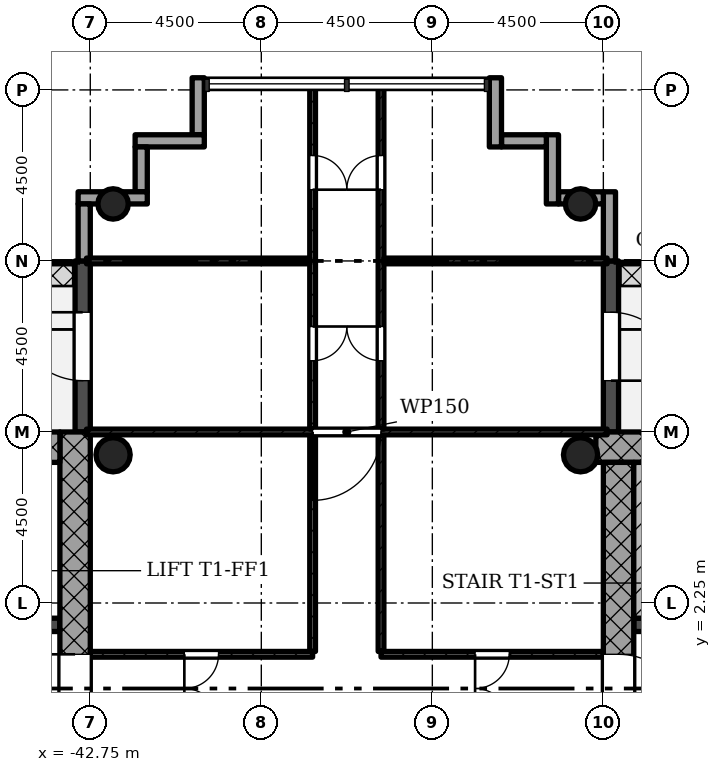
"""IFC4 building model, lengths in metres.
Left out: names, types, materials, properties, quantities, classifications, styles, units other than length and angle.
Written with IfcOpenShell. Run it as: python <this file> out.ifc"""

import sys

from ifc_helpers import new_model, si_unit, direction, frame, frame_2d, origin, origin_2d, place, context, subcontext, project, spatial, rectangle, hollow_circle, extrude, element, fill, save


model = new_model("IFC4")
c1 = context("Model", 3, precision=1e-05, world=origin(), true_north=direction((0.0, 1.0)))
c2 = subcontext(c1, "Body", "Model", "MODEL_VIEW")
j1 = project(units=[si_unit("LENGTHUNIT", "METRE"), si_unit("PLANEANGLEUNIT", "RADIAN")], contexts=[c1])
p1 = place(None, origin())
s1 = spatial("IfcSite", under=j1, at=p1, CompositionType="ELEMENT")
p2 = place(p1, origin())
s2 = spatial("IfcBuilding", under=s1, at=p2, CompositionType="ELEMENT")
p3 = place(p2, frame((0.0, 0.0, 128.7)))
s3 = spatial("IfcBuildingStorey", under=s2, at=p3, CompositionType="ELEMENT", Elevation=128.7)
p4 = place(p3, frame((-20.652, 6.35, 0.0), z_axis=(0.0, 0.0, 1.0), x_axis=(-1.0, 0.0, 0.0)))
e1 = element("IfcWall", 1, at=p4, inside=s3, PredefinedType="SHEAR", context=c2, shape_type="SweptSolid", body=[
    extrude(rectangle(XDim=8.796, YDim=0.8, at=frame_2d((4.398, 0.0))), origin(), (0.0, 0.0, 1.0), 5.0),
])
p5 = place(p3, frame((-28.85, 5.95, 0.0), z_axis=(0.0, 0.0, 1.0), x_axis=(0.0, -1.0, 0.0)))
e2 = element("IfcWall", 2, at=p5, inside=s3, PredefinedType="SHEAR", context=c2, shape_type="SweptSolid", body=[
    extrude(rectangle(XDim=12.7, YDim=0.8, at=frame_2d((6.35, 0.0))), origin(), (0.0, 0.0, 1.0), 5.0),
])
p6 = place(p5, frame((5.05, 0.0, 0.0)))
e3 = element("IfcOpeningElement", 3, at=p6, cuts=e2, PredefinedType="OPENING", context=c2, shape_type="SweptSolid", body=[
    extrude(rectangle(XDim=1.8, YDim=2.1, at=frame_2d((0.9, 1.05))), frame((0.0, 0.41, 0.0), z_axis=(0.0, -1.0, 0.0), x_axis=(1.0, 0.0, 0.0)), (0.0, 0.0, 1.0), 0.82),
])
p7 = place(p3, frame((-28.45, 1.675, 0.0), z_axis=(0.0, 0.0, 1.0), x_axis=(1.0, 0.0, 0.0)))
e4 = element("IfcWall", 4, at=p7, inside=s3, PredefinedType="SHEAR", context=c2, shape_type="SweptSolid", body=[
    extrude(rectangle(XDim=7.4, YDim=0.35, at=frame_2d((3.7, 0.0))), origin(), (0.0, 0.0, 1.0), 5.0),
])
p8 = place(p7, frame((0.85, 0.0, 0.0)))
e5 = element("IfcOpeningElement", 5, at=p8, cuts=e4, PredefinedType="OPENING", context=c2, shape_type="SweptSolid", body=[
    extrude(rectangle(XDim=0.9, YDim=2.1, at=frame_2d((0.45, 1.05))), frame((0.0, 0.185, 0.0), z_axis=(0.0, -1.0, 0.0), x_axis=(1.0, 0.0, 0.0)), (0.0, 0.0, 1.0), 0.37),
])
p9 = place(p3, frame((-43.15, -5.95, 0.0), z_axis=(0.0, 0.0, 1.0), x_axis=(0.0, 1.0, 0.0)))
e6 = element("IfcWall", 6, at=p9, inside=s3, PredefinedType="SHEAR", context=c2, shape_type="SweptSolid", body=[
    extrude(rectangle(XDim=12.7, YDim=0.8, at=frame_2d((6.35, 0.0))), origin(), (0.0, 0.0, 1.0), 5.0),
])
p10 = place(p9, frame((5.05, 0.0, 0.0)))
e7 = element("IfcOpeningElement", 7, at=p10, cuts=e6, PredefinedType="OPENING", context=c2, shape_type="SweptSolid", body=[
    extrude(rectangle(XDim=1.8, YDim=2.1, at=frame_2d((0.9, 1.05))), frame((0.0, 0.41, 0.0), z_axis=(0.0, -1.0, 0.0), x_axis=(1.0, 0.0, 0.0)), (0.0, 0.0, 1.0), 0.82),
])
p11 = place(p3, frame((-43.55, 6.35, 0.0), z_axis=(0.0, 0.0, 1.0), x_axis=(-1.0, 0.0, 0.0)))
e8 = element("IfcWall", 8, at=p11, inside=s3, PredefinedType="SHEAR", context=c2, shape_type="SweptSolid", body=[
    extrude(rectangle(XDim=8.2, YDim=0.8, at=frame_2d((4.1, 0.0))), origin(), (0.0, 0.0, 1.0), 5.0),
])
p12 = place(p3, frame((-50.95, 1.675, 0.0), z_axis=(0.0, 0.0, 1.0), x_axis=(1.0, 0.0, 0.0)))
e9 = element("IfcWall", 9, at=p12, inside=s3, PredefinedType="SHEAR", context=c2, shape_type="SweptSolid", body=[
    extrude(rectangle(XDim=7.4, YDim=0.35, at=frame_2d((3.7, 0.0))), origin(), (0.0, 0.0, 1.0), 5.0),
])
p13 = place(p12, frame((5.35, 0.0, 0.0)))
e10 = element("IfcOpeningElement", 10, at=p13, cuts=e9, PredefinedType="OPENING", context=c2, shape_type="SweptSolid", body=[
    extrude(rectangle(XDim=1.1, YDim=2.1, at=frame_2d((0.55, 1.05))), frame((0.0, 0.185, 0.0), z_axis=(0.0, -1.0, 0.0), x_axis=(1.0, 0.0, 0.0)), (0.0, 0.0, 1.0), 0.37),
])
p14 = place(p12, frame((3.2, 0.0, 0.0)))
e11 = element("IfcOpeningElement", 11, at=p14, cuts=e9, PredefinedType="OPENING", context=c2, shape_type="SweptSolid", body=[
    extrude(rectangle(XDim=1.1, YDim=2.1, at=frame_2d((0.55, 1.05))), frame((0.0, 0.185, 0.0), z_axis=(0.0, -1.0, 0.0), x_axis=(1.0, 0.0, 0.0)), (0.0, 0.0, 1.0), 0.37),
])
p15 = place(p12, frame((1.0, 0.0, 0.0)))
e12 = element("IfcOpeningElement", 12, at=p15, cuts=e9, PredefinedType="OPENING", context=c2, shape_type="SweptSolid", body=[
    extrude(rectangle(XDim=1.1, YDim=2.1, at=frame_2d((0.55, 1.05))), frame((0.0, 0.185, 0.0), z_axis=(0.0, -1.0, 0.0), x_axis=(1.0, 0.0, 0.0)), (0.0, 0.0, 1.0), 0.37),
])
for number, where, z_axis, x_axis in (
    (13, (-29.85, 12.75, 0.0), (0.0, 0.0, 1.0), (1.0, 0.0, 0.0)),
    (14, (-42.15, 12.75, 0.0), (0.0, 0.0, 1.0), (1.0, 0.0, 0.0)),
):
    element("IfcColumn", number, at=place(p3, frame(where, z_axis=z_axis, x_axis=x_axis)), inside=s3, PredefinedType="COLUMN", context=c2, shape_type="SweptSolid", body=[
        extrude(hollow_circle(Radius=0.4, WallThickness=0.028, at=origin_2d()), origin(), (0.0, 0.0, 1.0), 5.0),
    ])
for number, where, z_axis, x_axis in (
    (15, (-29.85, 6.15, 0.0), (0.0, 0.0, 1.0), (1.0, 0.0, 0.0)),
    (16, (-42.15, 6.15, 0.0), (0.0, 0.0, 1.0), (1.0, 0.0, 0.0)),
):
    element("IfcColumn", number, at=place(p3, frame(where, z_axis=z_axis, x_axis=x_axis)), inside=s3, PredefinedType="COLUMN", context=c2, shape_type="SweptSolid", body=[
        extrude(hollow_circle(Radius=0.45, WallThickness=0.032, at=origin_2d()), origin(), (0.0, 0.0, 1.0), 5.0),
    ])
p16 = place(p3, frame((-29.05, 6.75, -0.02), z_axis=(0.0, 0.0, 1.0), x_axis=(0.0, 1.0, 0.0)))
e17 = element("IfcWall", 17, at=p16, inside=s3, PredefinedType="STANDARD", context=c2, shape_type="SweptSolid", body=[
    extrude(rectangle(XDim=4.5, YDim=0.4, at=frame_2d((2.25, 0.0))), origin(), (0.0, 0.0, 1.0), 4.72),
])
p17 = place(p16, frame((1.35, 0.0, 0.02)))
e18 = element("IfcOpeningElement", 18, at=p17, cuts=e17, PredefinedType="OPENING", context=c2, shape_type="SweptSolid", body=[
    extrude(rectangle(XDim=1.8, YDim=2.1, at=frame_2d((0.9, 1.05))), frame((0.0, 0.21, 0.0), z_axis=(0.0, -1.0, 0.0), x_axis=(1.0, 0.0, 0.0)), (0.0, 0.0, 1.0), 0.42),
])
p18 = place(p3, frame((-29.09, 11.25, -0.3), z_axis=(0.0, 0.0, 1.0), x_axis=(0.0, 1.0, 0.0)))
e19 = element("IfcWall", 19, at=p18, inside=s3, PredefinedType="STANDARD", context=c2, shape_type="SweptSolid", body=[
    extrude(rectangle(XDim=1.82, YDim=0.32, at=frame_2d((0.91, 0.0))), origin(), (0.0, 0.0, 1.0), 5.0),
])
p19 = place(p3, frame((-29.25, 12.91, -0.3), z_axis=(0.0, 0.0, 1.0), x_axis=(-1.0, 0.0, 0.0)))
e20 = element("IfcWall", 20, at=p19, inside=s3, PredefinedType="STANDARD", context=c2, shape_type="SweptSolid", body=[
    extrude(rectangle(XDim=1.18, YDim=0.32, at=frame_2d((0.59, 0.0))), origin(), (0.0, 0.0, 1.0), 5.0),
])
p20 = place(p3, frame((-30.59, 12.75, -0.3), z_axis=(0.0, 0.0, 1.0), x_axis=(0.0, 1.0, 0.0)))
e21 = element("IfcWall", 21, at=p20, inside=s3, PredefinedType="STANDARD", context=c2, shape_type="SweptSolid", body=[
    extrude(rectangle(XDim=1.82, YDim=0.32, at=frame_2d((0.91, 0.0))), origin(), (0.0, 0.0, 1.0), 5.0),
])
p21 = place(p3, frame((-30.75, 14.41, -0.3), z_axis=(0.0, 0.0, 1.0), x_axis=(-1.0, 0.0, 0.0)))
e22 = element("IfcWall", 22, at=p21, inside=s3, PredefinedType="STANDARD", context=c2, shape_type="SweptSolid", body=[
    extrude(rectangle(XDim=1.18, YDim=0.32, at=frame_2d((0.59, 0.0))), origin(), (0.0, 0.0, 1.0), 5.0),
])
p22 = place(p3, frame((-32.09, 14.25, -0.3), z_axis=(0.0, 0.0, 1.0), x_axis=(0.0, 1.0, 0.0)))
e23 = element("IfcWall", 23, at=p22, inside=s3, PredefinedType="STANDARD", context=c2, shape_type="SweptSolid", body=[
    extrude(rectangle(XDim=1.82, YDim=0.32, at=frame_2d((0.91, 0.0))), origin(), (0.0, 0.0, 1.0), 5.0),
])
p23 = place(p3, frame((-39.91, 16.07, -0.3), z_axis=(0.0, 0.0, 1.0), x_axis=(0.0, -1.0, 0.0)))
e24 = element("IfcWall", 24, at=p23, inside=s3, PredefinedType="STANDARD", context=c2, shape_type="SweptSolid", body=[
    extrude(rectangle(XDim=1.5, YDim=0.32, at=frame_2d((0.75, 0.0))), origin(), (0.0, 0.0, 1.0), 5.0),
])
p24 = place(p3, frame((-39.75, 14.41, -0.3), z_axis=(0.0, 0.0, 1.0), x_axis=(-1.0, 0.0, 0.0)))
e25 = element("IfcWall", 25, at=p24, inside=s3, PredefinedType="STANDARD", context=c2, shape_type="SweptSolid", body=[
    extrude(rectangle(XDim=1.82, YDim=0.32, at=frame_2d((0.91, 0.0))), origin(), (0.0, 0.0, 1.0), 5.0),
])
p25 = place(p3, frame((-41.41, 14.25, -0.3), z_axis=(0.0, 0.0, 1.0), x_axis=(0.0, -1.0, 0.0)))
e26 = element("IfcWall", 26, at=p25, inside=s3, PredefinedType="STANDARD", context=c2, shape_type="SweptSolid", body=[
    extrude(rectangle(XDim=1.18, YDim=0.32, at=frame_2d((0.59, 0.0))), origin(), (0.0, 0.0, 1.0), 5.0),
])
p26 = place(p3, frame((-41.25, 12.91, -0.3), z_axis=(0.0, 0.0, 1.0), x_axis=(-1.0, 0.0, 0.0)))
e27 = element("IfcWall", 27, at=p26, inside=s3, PredefinedType="STANDARD", context=c2, shape_type="SweptSolid", body=[
    extrude(rectangle(XDim=1.82, YDim=0.32, at=frame_2d((0.91, 0.0))), origin(), (0.0, 0.0, 1.0), 5.0),
])
p27 = place(p3, frame((-42.91, 12.75, -0.3), z_axis=(0.0, 0.0, 1.0), x_axis=(0.0, -1.0, 0.0)))
e28 = element("IfcWall", 28, at=p27, inside=s3, PredefinedType="STANDARD", context=c2, shape_type="SweptSolid", body=[
    extrude(rectangle(XDim=1.5, YDim=0.32, at=frame_2d((0.75, 0.0))), origin(), (0.0, 0.0, 1.0), 5.0),
])
p28 = place(p3, frame((-42.95, 11.25, -0.02), z_axis=(0.0, 0.0, 1.0), x_axis=(0.0, -1.0, 0.0)))
e29 = element("IfcWall", 29, at=p28, inside=s3, PredefinedType="STANDARD", context=c2, shape_type="SweptSolid", body=[
    extrude(rectangle(XDim=4.5, YDim=0.4, at=frame_2d((2.25, 0.0))), origin(), (0.0, 0.0, 1.0), 4.72),
])
p29 = place(p28, frame((1.35, 0.0, 0.02)))
e30 = element("IfcOpeningElement", 30, at=p29, cuts=e29, PredefinedType="OPENING", context=c2, shape_type="SweptSolid", body=[
    extrude(rectangle(XDim=1.8, YDim=2.1, at=frame_2d((0.9, 1.05))), frame((0.0, 0.21, 0.0), z_axis=(0.0, -1.0, 0.0), x_axis=(1.0, 0.0, 0.0)), (0.0, 0.0, 1.0), 0.42),
])
p30 = place(p3, frame((-35.1, 0.9, 0.0), z_axis=(0.0, 0.0, 1.0), x_axis=(1.0, 0.0, 0.0)))
e31 = element("IfcWall", 31, at=p30, inside=s3, PredefinedType="PARTITIONING", context=c2, shape_type="SweptSolid", body=[
    extrude(rectangle(XDim=5.85, YDim=0.15, at=frame_2d((2.925, 0.0))), origin(), (0.0, 0.0, 1.0), 4.58),
])
p31 = place(p30, frame((2.475, 0.0, 0.0)))
e32 = element("IfcOpeningElement", 32, at=p31, cuts=e31, PredefinedType="OPENING", context=c2, shape_type="SweptSolid", body=[
    extrude(rectangle(XDim=0.9, YDim=2.1, at=frame_2d((0.45, 1.05))), frame((0.0, 0.085, 0.0), z_axis=(0.0, -1.0, 0.0), x_axis=(1.0, 0.0, 0.0)), (0.0, 0.0, 1.0), 0.17),
])
p32 = place(p3, frame((-35.1, 0.975, 0.0), z_axis=(0.0, 0.0, 1.0), x_axis=(0.0, 1.0, 0.0)))
e33 = element("IfcWall", 33, at=p32, inside=s3, PredefinedType="PARTITIONING", context=c2, shape_type="SweptSolid", body=[
    extrude(rectangle(XDim=5.7, YDim=0.15, at=frame_2d((2.85, 0.0))), origin(), (0.0, 0.0, 1.0), 4.58),
])
p33 = place(p3, frame((-42.75, 0.9, 0.0), z_axis=(0.0, 0.0, 1.0), x_axis=(1.0, 0.0, 0.0)))
e34 = element("IfcWall", 34, at=p33, inside=s3, PredefinedType="PARTITIONING", context=c2, shape_type="SweptSolid", body=[
    extrude(rectangle(XDim=5.85, YDim=0.15, at=frame_2d((2.925, 0.0))), origin(), (0.0, 0.0, 1.0), 4.58),
])
p34 = place(p33, frame((2.475, 0.0, 0.0)))
e35 = element("IfcOpeningElement", 35, at=p34, cuts=e34, PredefinedType="OPENING", context=c2, shape_type="SweptSolid", body=[
    extrude(rectangle(XDim=0.9, YDim=2.1, at=frame_2d((0.45, 1.05))), frame((0.0, 0.085, 0.0), z_axis=(0.0, -1.0, 0.0), x_axis=(1.0, 0.0, 0.0)), (0.0, 0.0, 1.0), 0.17),
])
p35 = place(p3, frame((-36.9, 0.975, 0.0), z_axis=(0.0, 0.0, 1.0), x_axis=(0.0, 1.0, 0.0)))
e36 = element("IfcWall", 36, at=p35, inside=s3, PredefinedType="PARTITIONING", context=c2, shape_type="SweptSolid", body=[
    extrude(rectangle(XDim=5.7, YDim=0.15, at=frame_2d((2.85, 0.0))), origin(), (0.0, 0.0, 1.0), 4.58),
])
p36 = place(p3, frame((-42.85, 6.75, 0.0), z_axis=(0.0, 0.0, 1.0), x_axis=(1.0, 0.0, 0.0)))
e37 = element("IfcWall", 37, at=p36, inside=s3, PredefinedType="PARTITIONING", context=c2, shape_type="SweptSolid", body=[
    extrude(rectangle(XDim=13.7, YDim=0.15, at=frame_2d((6.85, 0.0))), origin(), (0.0, 0.0, 1.0), 4.58),
])
p37 = place(p36, frame((5.95, 0.0, 0.0)))
e38 = element("IfcOpeningElement", 38, at=p37, cuts=e37, PredefinedType="OPENING", context=c2, shape_type="SweptSolid", body=[
    extrude(rectangle(XDim=1.8, YDim=2.1, at=frame_2d((0.9, 1.05))), frame((0.0, 0.085, 0.0), z_axis=(0.0, -1.0, 0.0), x_axis=(1.0, 0.0, 0.0)), (0.0, 0.0, 1.0), 0.17),
])
p38 = place(p3, frame((-35.1, 6.825, 0.0), z_axis=(0.0, 0.0, 1.0), x_axis=(0.0, 1.0, 0.0)))
e39 = element("IfcWall", 39, at=p38, inside=s3, PredefinedType="PARTITIONING", context=c2, shape_type="SweptSolid", body=[
    extrude(rectangle(XDim=9.025, YDim=0.15, at=frame_2d((4.513, 0.0))), origin(), (0.0, 0.0, 1.0), 4.58),
])
p39 = place(p38, frame((1.8, 0.0, 0.0)))
e40 = element("IfcOpeningElement", 40, at=p39, cuts=e39, PredefinedType="OPENING", context=c2, shape_type="SweptSolid", body=[
    extrude(rectangle(XDim=0.9, YDim=2.1, at=frame_2d((0.45, 1.05))), frame((0.0, 0.085, 0.0), z_axis=(0.0, -1.0, 0.0), x_axis=(1.0, 0.0, 0.0)), (0.0, 0.0, 1.0), 0.17),
])
p40 = place(p38, frame((6.3, 0.0, 0.0)))
e41 = element("IfcOpeningElement", 41, at=p40, cuts=e39, PredefinedType="OPENING", context=c2, shape_type="SweptSolid", body=[
    extrude(rectangle(XDim=0.9, YDim=2.1, at=frame_2d((0.45, 1.05))), frame((0.0, 0.085, 0.0), z_axis=(0.0, -1.0, 0.0), x_axis=(1.0, 0.0, 0.0)), (0.0, 0.0, 1.0), 0.17),
])
p41 = place(p3, frame((-35.025, 11.25, 0.0), z_axis=(0.0, 0.0, 1.0), x_axis=(1.0, 0.0, 0.0)))
e42 = element("IfcWall", 42, at=p41, inside=s3, PredefinedType="PARTITIONING", context=c2, shape_type="SweptSolid", body=[
    extrude(rectangle(XDim=5.875, YDim=0.15, at=frame_2d((2.938, 0.0))), origin(), (0.0, 0.0, 1.0), 4.58),
])
p42 = place(p3, frame((-36.9, 6.825, 0.0), z_axis=(0.0, 0.0, 1.0), x_axis=(0.0, 1.0, 0.0)))
e43 = element("IfcWall", 43, at=p42, inside=s3, PredefinedType="PARTITIONING", context=c2, shape_type="SweptSolid", body=[
    extrude(rectangle(XDim=9.025, YDim=0.15, at=frame_2d((4.513, 0.0))), origin(), (0.0, 0.0, 1.0), 4.58),
])
p43 = place(p42, frame((1.8, 0.0, 0.0)))
e44 = element("IfcOpeningElement", 44, at=p43, cuts=e43, PredefinedType="OPENING", context=c2, shape_type="SweptSolid", body=[
    extrude(rectangle(XDim=0.9, YDim=2.1, at=frame_2d((0.45, 1.05))), frame((0.0, 0.085, 0.0), z_axis=(0.0, -1.0, 0.0), x_axis=(1.0, 0.0, 0.0)), (0.0, 0.0, 1.0), 0.17),
])
p44 = place(p42, frame((6.3, 0.0, 0.0)))
e45 = element("IfcOpeningElement", 45, at=p44, cuts=e43, PredefinedType="OPENING", context=c2, shape_type="SweptSolid", body=[
    extrude(rectangle(XDim=0.9, YDim=2.1, at=frame_2d((0.45, 1.05))), frame((0.0, 0.085, 0.0), z_axis=(0.0, -1.0, 0.0), x_axis=(1.0, 0.0, 0.0)), (0.0, 0.0, 1.0), 0.17),
])
p45 = place(p3, frame((-36.975, 11.25, 0.0), z_axis=(0.0, 0.0, 1.0), x_axis=(-1.0, 0.0, 0.0)))
e46 = element("IfcWall", 46, at=p45, inside=s3, PredefinedType="PARTITIONING", context=c2, shape_type="SweptSolid", body=[
    extrude(rectangle(XDim=5.875, YDim=0.15, at=frame_2d((2.938, 0.0))), origin(), (0.0, 0.0, 1.0), 4.58),
])
p46 = place(p3, frame((-28.25, 1.85, 0.0), z_axis=(0.0, 0.0, 1.0), x_axis=(0.0, 1.0, 0.0)))
e47 = element("IfcWall", 47, at=p46, inside=s3, PredefinedType="SHEAR", context=c2, shape_type="SweptSolid", body=[
    extrude(rectangle(XDim=4.1, YDim=0.4, at=frame_2d((2.05, 0.0))), origin(), (0.0, 0.0, 1.0), 5.0),
])
p47 = place(p17, origin())
e48 = element("IfcDoor", 48, at=p47, inside=s3, OperationType="SINGLE_SWING_LEFT", PredefinedType="DOOR", context=c2, shape_type="SweptSolid", body=[
    extrude(rectangle(XDim=1.8, YDim=2.1, at=frame_2d((0.9, 1.05))), frame((0.0, 0.025, 0.0), z_axis=(0.0, -1.0, 0.0), x_axis=(1.0, 0.0, 0.0)), (0.0, 0.0, 1.0), 0.05),
])
fill(e18, e48)
p48 = place(p29, origin())
e49 = element("IfcDoor", 49, at=p48, inside=s3, OperationType="SINGLE_SWING_LEFT", PredefinedType="DOOR", context=c2, shape_type="SweptSolid", body=[
    extrude(rectangle(XDim=1.8, YDim=2.1, at=frame_2d((0.9, 1.05))), frame((0.0, 0.025, 0.0), z_axis=(0.0, -1.0, 0.0), x_axis=(1.0, 0.0, 0.0)), (0.0, 0.0, 1.0), 0.05),
])
fill(e30, e49)
p49 = place(p31, origin())
e50 = element("IfcDoor", 50, at=p49, inside=s3, OperationType="SINGLE_SWING_LEFT", PredefinedType="DOOR", context=c2, shape_type="SweptSolid", body=[
    extrude(rectangle(XDim=0.9, YDim=2.1, at=frame_2d((0.45, 1.05))), frame((0.0, 0.025, 0.0), z_axis=(0.0, -1.0, 0.0), x_axis=(1.0, 0.0, 0.0)), (0.0, 0.0, 1.0), 0.05),
])
fill(e32, e50)
p50 = place(p34, origin())
e51 = element("IfcDoor", 51, at=p50, inside=s3, OperationType="SINGLE_SWING_LEFT", PredefinedType="DOOR", context=c2, shape_type="SweptSolid", body=[
    extrude(rectangle(XDim=0.9, YDim=2.1, at=frame_2d((0.45, 1.05))), frame((0.0, 0.025, 0.0), z_axis=(0.0, -1.0, 0.0), x_axis=(1.0, 0.0, 0.0)), (0.0, 0.0, 1.0), 0.05),
])
fill(e35, e51)
p51 = place(p37, origin())
e52 = element("IfcDoor", 52, at=p51, inside=s3, OperationType="SINGLE_SWING_LEFT", PredefinedType="DOOR", context=c2, shape_type="SweptSolid", body=[
    extrude(rectangle(XDim=1.8, YDim=2.1, at=frame_2d((0.9, 1.05))), frame((0.0, 0.025, 0.0), z_axis=(0.0, -1.0, 0.0), x_axis=(1.0, 0.0, 0.0)), (0.0, 0.0, 1.0), 0.05),
])
fill(e38, e52)
p52 = place(p39, origin())
e53 = element("IfcDoor", 53, at=p52, inside=s3, OperationType="SINGLE_SWING_LEFT", PredefinedType="DOOR", context=c2, shape_type="SweptSolid", body=[
    extrude(rectangle(XDim=0.9, YDim=2.1, at=frame_2d((0.45, 1.05))), frame((0.0, 0.025, 0.0), z_axis=(0.0, -1.0, 0.0), x_axis=(1.0, 0.0, 0.0)), (0.0, 0.0, 1.0), 0.05),
])
fill(e40, e53)
p53 = place(p40, origin())
e54 = element("IfcDoor", 54, at=p53, inside=s3, OperationType="SINGLE_SWING_RIGHT", PredefinedType="DOOR", context=c2, shape_type="SweptSolid", body=[
    extrude(rectangle(XDim=0.9, YDim=2.1, at=frame_2d((0.45, 1.05))), frame((0.0, 0.025, 0.0), z_axis=(0.0, -1.0, 0.0), x_axis=(1.0, 0.0, 0.0)), (0.0, 0.0, 1.0), 0.05),
])
fill(e41, e54)
p54 = place(p43, origin())
e55 = element("IfcDoor", 55, at=p54, inside=s3, OperationType="SINGLE_SWING_RIGHT", PredefinedType="DOOR", context=c2, shape_type="SweptSolid", body=[
    extrude(rectangle(XDim=0.9, YDim=2.1, at=frame_2d((0.45, 1.05))), frame((0.0, 0.025, 0.0), z_axis=(0.0, -1.0, 0.0), x_axis=(1.0, 0.0, 0.0)), (0.0, 0.0, 1.0), 0.05),
])
fill(e44, e55)
p55 = place(p44, origin())
e56 = element("IfcDoor", 56, at=p55, inside=s3, OperationType="SINGLE_SWING_LEFT", PredefinedType="DOOR", context=c2, shape_type="SweptSolid", body=[
    extrude(rectangle(XDim=0.9, YDim=2.1, at=frame_2d((0.45, 1.05))), frame((0.0, 0.025, 0.0), z_axis=(0.0, -1.0, 0.0), x_axis=(1.0, 0.0, 0.0)), (0.0, 0.0, 1.0), 0.05),
])
fill(e45, e56)
p56 = place(p6, origin())
e57 = element("IfcDoor", 57, at=p56, inside=s3, OperationType="SINGLE_SWING_LEFT", PredefinedType="DOOR", context=c2, shape_type="SweptSolid", body=[
    extrude(rectangle(XDim=1.8, YDim=2.1, at=frame_2d((0.9, 1.05))), frame((0.0, 0.025, 0.0), z_axis=(0.0, -1.0, 0.0), x_axis=(1.0, 0.0, 0.0)), (0.0, 0.0, 1.0), 0.05),
])
fill(e3, e57)
p57 = place(p10, origin())
e58 = element("IfcDoor", 58, at=p57, inside=s3, OperationType="SINGLE_SWING_LEFT", PredefinedType="DOOR", context=c2, shape_type="SweptSolid", body=[
    extrude(rectangle(XDim=1.8, YDim=2.1, at=frame_2d((0.9, 1.05))), frame((0.0, 0.025, 0.0), z_axis=(0.0, -1.0, 0.0), x_axis=(1.0, 0.0, 0.0)), (0.0, 0.0, 1.0), 0.05),
])
fill(e7, e58)
save(model, sys.argv[1])
